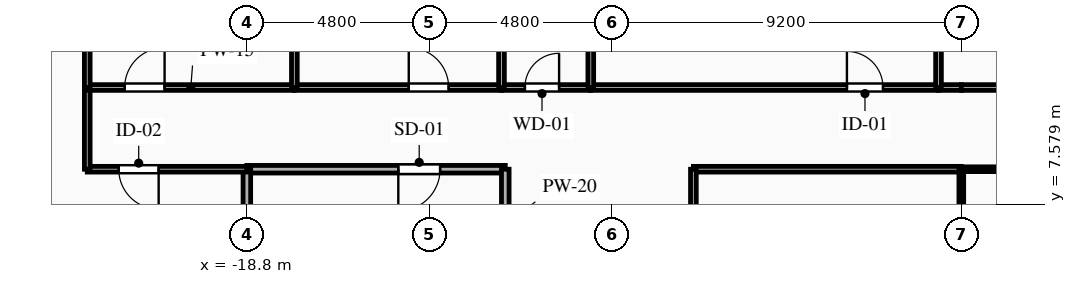
"""IFC4 building model, lengths in metres.
Left out: names, types, materials, properties, quantities, classifications, styles, units other than length and angle.
Written with IfcOpenShell. Run it as: python <this file> out.ifc"""

import sys

from ifc_helpers import new_model, si_unit, direction, frame, frame_2d, origin, place, context, subcontext, project, spatial, rectangle, extrude, element, fill, save


model = new_model("IFC4")
c1 = context("Model", 3, precision=1e-05, world=origin(), true_north=direction((0.0, 1.0)))
c2 = subcontext(c1, "Body", "Model", "MODEL_VIEW")
j1 = project(units=[si_unit("LENGTHUNIT", "METRE"), si_unit("PLANEANGLEUNIT", "RADIAN")], contexts=[c1])
p1 = place(None, origin())
s1 = spatial("IfcSite", under=j1, at=p1, CompositionType="ELEMENT")
p2 = place(p1, origin())
s2 = spatial("IfcBuilding", under=s1, at=p2, CompositionType="ELEMENT")
p3 = place(p2, frame((0.0, 0.0, 63.85)))
s3 = spatial("IfcBuildingStorey", under=s2, at=p3, CompositionType="ELEMENT", Elevation=63.85)
p4 = place(p3, frame((-12.0, 8.5, 0.0), z_axis=(0.0, 0.0, 1.0), x_axis=(-1.0, 0.0, 0.0)))
e1 = element("IfcWall", 1, at=p4, inside=s3, PredefinedType="PARTITIONING", context=c2, shape_type="SweptSolid", body=[
    extrude(rectangle(XDim=6.8, YDim=0.2, at=frame_2d((3.4, 0.0))), origin(), (0.0, 0.0, 1.0), 3.035),
])
p5 = place(p4, frame((1.715, 0.0, 0.0)))
e2 = element("IfcOpeningElement", 2, at=p5, cuts=e1, PredefinedType="OPENING", context=c2, shape_type="SweptSolid", body=[
    extrude(rectangle(XDim=1.1, YDim=2.15, at=frame_2d((0.55, 1.075))), frame((0.0, 0.11, 0.0), z_axis=(0.0, -1.0, 0.0), x_axis=(1.0, 0.0, 0.0)), (0.0, 0.0, 1.0), 0.22),
])
p6 = place(p3, frame((-12.0, 5.6, 0.0), z_axis=(0.0, 0.0, 1.0), x_axis=(0.0, 1.0, 0.0)))
e3 = element("IfcWall", 3, at=p6, inside=s3, PredefinedType="PARTITIONING", context=c2, shape_type="SweptSolid", body=[
    extrude(rectangle(XDim=2.9, YDim=0.2, at=frame_2d((1.45, 0.0))), origin(), (0.0, 0.0, 1.0), 3.035),
])
p7 = place(p3, frame((-18.8, 8.5, 0.0), z_axis=(0.0, 0.0, 1.0), x_axis=(0.0, -1.0, 0.0)))
e4 = element("IfcWall", 4, at=p7, inside=s3, PredefinedType="PARTITIONING", context=c2, shape_type="SweptSolid", body=[
    extrude(rectangle(XDim=2.173, YDim=0.2, at=frame_2d((1.086, 0.0))), origin(), (0.0, 0.0, 1.0), 2.52),
])
p8 = place(p3, frame((-18.8, 8.5, 0.0), z_axis=(0.0, 0.0, 1.0), x_axis=(-1.0, 0.0, 0.0)))
e5 = element("IfcWall", 5, at=p8, inside=s3, PredefinedType="PARTITIONING", context=c2, shape_type="SweptSolid", body=[
    extrude(rectangle(XDim=4.2, YDim=0.15, at=frame_2d((2.1, 0.0))), origin(), (0.0, 0.0, 1.0), 3.035),
])
p9 = place(p8, frame((2.321, 0.0, 0.0)))
e6 = element("IfcOpeningElement", 6, at=p9, cuts=e5, PredefinedType="OPENING", context=c2, shape_type="SweptSolid", body=[
    extrude(rectangle(XDim=1.05, YDim=2.15, at=frame_2d((0.525, 1.075))), frame((0.0, 0.085, 0.0), z_axis=(0.0, -1.0, 0.0), x_axis=(1.0, 0.0, 0.0)), (0.0, 0.0, 1.0), 0.17),
])
p10 = place(p3, frame((-23.0, 8.5, 0.0), z_axis=(0.0, 0.0, 1.0), x_axis=(0.0, 1.0, 0.0)))
e7 = element("IfcWall", 7, at=p10, inside=s3, PredefinedType="PARTITIONING", context=c2, shape_type="SweptSolid", body=[
    extrude(rectangle(XDim=2.15, YDim=0.15, at=frame_2d((1.075, 0.0))), origin(), (0.0, 0.0, 1.0), 3.035),
])
p11 = place(p3, frame((-23.0, 10.65, 0.0), z_axis=(0.0, 0.0, 1.0), x_axis=(1.0, 0.0, 0.0)))
e8 = element("IfcWall", 8, at=p11, inside=s3, PredefinedType="PARTITIONING", context=c2, shape_type="SweptSolid", body=[
    extrude(rectangle(XDim=5.45, YDim=0.15, at=frame_2d((2.725, 0.0))), origin(), (0.0, 0.0, 1.0), 3.035),
])
p12 = place(p11, frame((0.985, 0.0, 0.0)))
e9 = element("IfcOpeningElement", 9, at=p12, cuts=e8, PredefinedType="OPENING", context=c2, shape_type="SweptSolid", body=[
    extrude(rectangle(XDim=1.05, YDim=2.15, at=frame_2d((0.525, 1.075))), frame((0.0, 0.085, 0.0), z_axis=(0.0, -1.0, 0.0), x_axis=(1.0, 0.0, 0.0)), (0.0, 0.0, 1.0), 0.17),
])
p13 = place(p3, frame((-17.55, 10.65, 0.0), z_axis=(0.0, 0.0, 1.0), x_axis=(1.0, 0.0, 0.0)))
e10 = element("IfcWall", 10, at=p13, inside=s3, PredefinedType="PARTITIONING", context=c2, shape_type="SweptSolid", body=[
    extrude(rectangle(XDim=5.45, YDim=0.15, at=frame_2d((2.725, 0.0))), origin(), (0.0, 0.0, 1.0), 3.035),
])
p14 = place(p13, frame((3.01, 0.0, 0.0)))
e11 = element("IfcOpeningElement", 11, at=p14, cuts=e10, PredefinedType="OPENING", context=c2, shape_type="SweptSolid", body=[
    extrude(rectangle(XDim=1.05, YDim=2.15, at=frame_2d((0.525, 1.075))), frame((0.0, 0.085, 0.0), z_axis=(0.0, -1.0, 0.0), x_axis=(1.0, 0.0, 0.0)), (0.0, 0.0, 1.0), 0.17),
])
p15 = place(p3, frame((-12.1, 10.65, 0.0), z_axis=(0.0, 0.0, 1.0), x_axis=(1.0, 0.0, 0.0)))
e12 = element("IfcWall", 12, at=p15, inside=s3, PredefinedType="PLUMBINGWALL", context=c2, shape_type="SweptSolid", body=[
    extrude(rectangle(XDim=2.35, YDim=0.15, at=frame_2d((1.175, 0.0))), origin(), (0.0, 0.0, 1.0), 3.035),
])
p16 = place(p15, frame((0.616, 0.0, 0.0)))
e13 = element("IfcOpeningElement", 13, at=p16, cuts=e12, PredefinedType="OPENING", context=c2, shape_type="SweptSolid", body=[
    extrude(rectangle(XDim=0.9, YDim=2.1, at=frame_2d((0.45, 1.05))), frame((0.0, 0.085, 0.0), z_axis=(0.0, -1.0, 0.0), x_axis=(1.0, 0.0, 0.0)), (0.0, 0.0, 1.0), 0.17),
])
p17 = place(p3, frame((-9.75, 10.65, 0.0), z_axis=(0.0, 0.0, 1.0), x_axis=(1.0, 0.0, 0.0)))
e14 = element("IfcWall", 14, at=p17, inside=s3, PredefinedType="PARTITIONING", context=c2, shape_type="SweptSolid", body=[
    extrude(rectangle(XDim=9.15, YDim=0.15, at=frame_2d((4.575, 0.0))), origin(), (0.0, 0.0, 1.0), 3.035),
])
p18 = place(p17, frame((6.74, 0.0, 0.0)))
e15 = element("IfcOpeningElement", 15, at=p18, cuts=e14, PredefinedType="OPENING", context=c2, shape_type="SweptSolid", body=[
    extrude(rectangle(XDim=0.95, YDim=2.1, at=frame_2d((0.475, 1.05))), frame((0.0, 0.085, 0.0), z_axis=(0.0, -1.0, 0.0), x_axis=(1.0, 0.0, 0.0)), (0.0, 0.0, 1.0), 0.17),
])
p19 = place(p3, frame((-0.6, 10.65, 0.0), z_axis=(0.0, 0.0, 1.0), x_axis=(1.0, 0.0, 0.0)))
e16 = element("IfcWall", 16, at=p19, inside=s3, PredefinedType="PLUMBINGWALL", context=c2, shape_type="SweptSolid", body=[
    extrude(rectangle(XDim=0.6, YDim=0.15, at=frame_2d((0.3, 0.0))), origin(), (0.0, 0.0, 1.0), 3.035),
])
p20 = place(p3, frame((0.0, 8.5, 0.0), z_axis=(0.0, 0.0, 1.0), x_axis=(-1.0, 0.0, 0.0)))
e17 = element("IfcWall", 17, at=p20, inside=s3, PredefinedType="PARTITIONING", context=c2, shape_type="SweptSolid", body=[
    extrude(rectangle(XDim=7.05, YDim=0.15, at=frame_2d((3.525, 0.0))), origin(), (0.0, 0.0, 1.0), 3.035),
])
p21 = place(p3, frame((0.0, 10.65, 0.0), z_axis=(0.0, 0.0, 1.0), x_axis=(1.0, 0.0, 0.0)))
e18 = element("IfcWall", 18, at=p21, inside=s3, PredefinedType="PLUMBINGWALL", context=c2, shape_type="SweptSolid", body=[
    extrude(rectangle(XDim=1.85, YDim=0.15, at=frame_2d((0.925, 0.0))), origin(), (0.0, 0.0, 1.0), 3.035),
])
p22 = place(p3, frame((7.05, 8.5, 0.0), z_axis=(0.0, 0.0, 1.0), x_axis=(-1.0, 0.0, 0.0)))
e19 = element("IfcWall", 19, at=p22, inside=s3, PredefinedType="PARTITIONING", context=c2, shape_type="SweptSolid", body=[
    extrude(rectangle(XDim=7.05, YDim=0.125, at=frame_2d((3.525, 0.0))), origin(), (0.0, 0.0, 1.0), 3.035),
])
p23 = place(p3, frame((-7.05, 8.5, 0.0), z_axis=(0.0, 0.0, 1.0), x_axis=(0.0, -1.0, 0.0)))
e20 = element("IfcWall", 20, at=p23, inside=s3, PredefinedType="PARTITIONING", context=c2, shape_type="SweptSolid", body=[
    extrude(rectangle(XDim=14.1, YDim=0.15, at=frame_2d((7.05, 0.0))), origin(), (0.0, 0.0, 1.0), 3.035),
])
p24 = place(p23, frame((8.074, 0.0, 0.0)))
e21 = element("IfcOpeningElement", 21, at=p24, cuts=e20, PredefinedType="OPENING", context=c2, shape_type="SweptSolid", body=[
    extrude(rectangle(XDim=0.95, YDim=2.1, at=frame_2d((0.475, 1.05))), frame((0.0, 0.085, 0.0), z_axis=(0.0, -1.0, 0.0), x_axis=(1.0, 0.0, 0.0)), (0.0, 0.0, 1.0), 0.17),
])
for number, where, z_axis, x_axis in (
    (22, (-23.0, 19.4, 0.0), (0.0, 0.0, 1.0), (0.0, -1.0, 0.0)),
    (23, (-17.55, 19.4, 0.0), (0.0, 0.0, 1.0), (0.0, -1.0, 0.0)),
):
    element("IfcWall", number, at=place(p3, frame(where, z_axis=z_axis, x_axis=x_axis)), inside=s3, PredefinedType="PARTITIONING", context=c2, shape_type="SweptSolid", body=[
        extrude(rectangle(XDim=8.75, YDim=0.15, at=frame_2d((4.375, 0.0))), origin(), (0.0, 0.0, 1.0), 3.035),
    ])
for number, where, z_axis, x_axis in (
    (24, (-12.1, 19.4, 0.0), (0.0, 0.0, 1.0), (0.0, -1.0, 0.0)),
    (25, (-9.75, 19.4, 0.0), (0.0, 0.0, 1.0), (0.0, -1.0, 0.0)),
):
    element("IfcWall", number, at=place(p3, frame(where, z_axis=z_axis, x_axis=x_axis)), inside=s3, PredefinedType="PLUMBINGWALL", context=c2, shape_type="SweptSolid", body=[
        extrude(rectangle(XDim=8.75, YDim=0.15, at=frame_2d((4.375, 0.0))), origin(), (0.0, 0.0, 1.0), 3.035),
    ])
p25 = place(p3, frame((-0.6, 12.8, 0.0), z_axis=(0.0, 0.0, 1.0), x_axis=(0.0, -1.0, 0.0)))
e26 = element("IfcWall", 26, at=p25, inside=s3, PredefinedType="PLUMBINGWALL", context=c2, shape_type="SweptSolid", body=[
    extrude(rectangle(XDim=2.15, YDim=0.15, at=frame_2d((1.075, 0.0))), origin(), (0.0, 0.0, 1.0), 3.035),
])
p26 = place(p3, frame((0.0, 8.5, 0.0), z_axis=(0.0, 0.0, 1.0), x_axis=(0.0, -1.0, 0.0)))
e27 = element("IfcWall", 27, at=p26, inside=s3, PredefinedType="PARTITIONING", context=c2, shape_type="SweptSolid", body=[
    extrude(rectangle(XDim=14.1, YDim=0.125, at=frame_2d((7.05, 0.0))), origin(), (0.0, 0.0, 1.0), 3.035),
])
p27 = place(p5, origin())
e28 = element("IfcDoor", 28, at=p27, inside=s3, OperationType="SINGLE_SWING_RIGHT", PredefinedType="DOOR", context=c2, shape_type="SweptSolid", body=[
    extrude(rectangle(XDim=1.1, YDim=2.15, at=frame_2d((0.55, 1.075))), frame((0.0, 0.025, 0.0), z_axis=(0.0, -1.0, 0.0), x_axis=(1.0, 0.0, 0.0)), (0.0, 0.0, 1.0), 0.05),
])
fill(e2, e28)
p28 = place(p9, origin())
e29 = element("IfcDoor", 29, at=p28, inside=s3, OperationType="SINGLE_SWING_LEFT", PredefinedType="DOOR", context=c2, shape_type="SweptSolid", body=[
    extrude(rectangle(XDim=1.05, YDim=2.15, at=frame_2d((0.525, 1.075))), frame((0.0, 0.025, 0.0), z_axis=(0.0, -1.0, 0.0), x_axis=(1.0, 0.0, 0.0)), (0.0, 0.0, 1.0), 0.05),
])
fill(e6, e29)
p29 = place(p12, origin())
e30 = element("IfcDoor", 30, at=p29, inside=s3, OperationType="SINGLE_SWING_RIGHT", PredefinedType="DOOR", context=c2, shape_type="SweptSolid", body=[
    extrude(rectangle(XDim=1.05, YDim=2.15, at=frame_2d((0.525, 1.075))), frame((0.0, 0.025, 0.0), z_axis=(0.0, -1.0, 0.0), x_axis=(1.0, 0.0, 0.0)), (0.0, 0.0, 1.0), 0.05),
])
fill(e9, e30)
p30 = place(p14, origin())
e31 = element("IfcDoor", 31, at=p30, inside=s3, OperationType="SINGLE_SWING_LEFT", PredefinedType="DOOR", context=c2, shape_type="SweptSolid", body=[
    extrude(rectangle(XDim=1.05, YDim=2.15, at=frame_2d((0.525, 1.075))), frame((0.0, 0.025, 0.0), z_axis=(0.0, -1.0, 0.0), x_axis=(1.0, 0.0, 0.0)), (0.0, 0.0, 1.0), 0.05),
])
fill(e11, e31)
p31 = place(p16, origin())
e32 = element("IfcDoor", 32, at=p31, inside=s3, OperationType="SINGLE_SWING_RIGHT", PredefinedType="DOOR", context=c2, shape_type="SweptSolid", body=[
    extrude(rectangle(XDim=0.9, YDim=2.1, at=frame_2d((0.45, 1.05))), frame((0.0, 0.025, 0.0), z_axis=(0.0, -1.0, 0.0), x_axis=(1.0, 0.0, 0.0)), (0.0, 0.0, 1.0), 0.05),
])
fill(e13, e32)
p32 = place(p18, origin())
e33 = element("IfcDoor", 33, at=p32, inside=s3, OperationType="SINGLE_SWING_LEFT", PredefinedType="DOOR", context=c2, shape_type="SweptSolid", body=[
    extrude(rectangle(XDim=0.95, YDim=2.1, at=frame_2d((0.475, 1.05))), frame((0.0, 0.025, 0.0), z_axis=(0.0, -1.0, 0.0), x_axis=(1.0, 0.0, 0.0)), (0.0, 0.0, 1.0), 0.05),
])
fill(e15, e33)
save(model, sys.argv[1])
